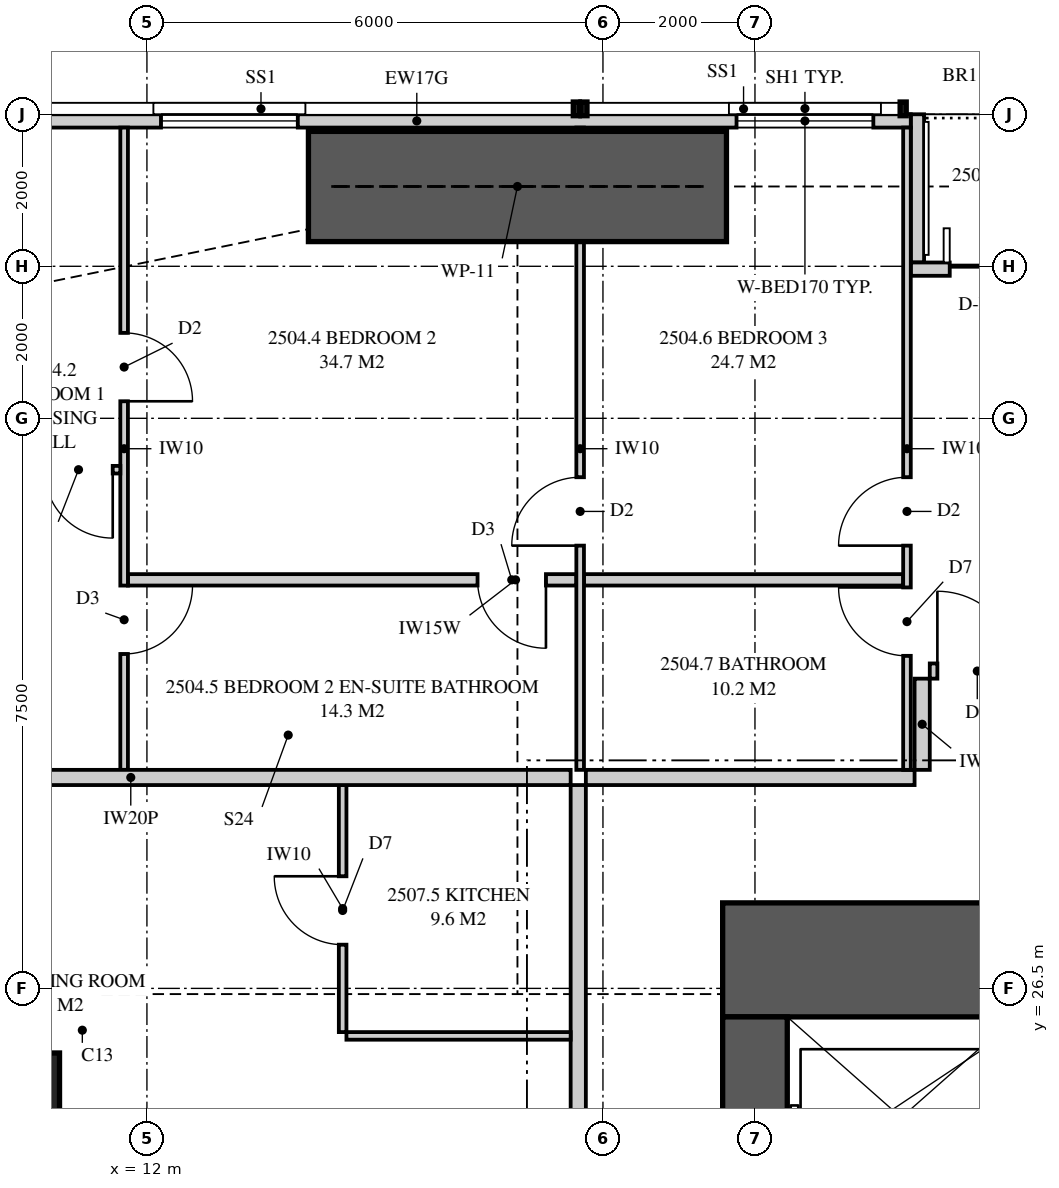
"""IFC4 building model, lengths in metres.
Left out: names, types, materials, properties, quantities, classifications, styles, units other than length and angle.
Written with IfcOpenShell. Run it as: python <this file> out.ifc"""

import sys

from ifc_helpers import new_model, si_unit, direction, frame, frame_2d, origin, origin_2d, place, context, subcontext, project, spatial, polyline, rectangle, outline, extrude, element, fill, save


model = new_model("IFC4")
c1 = context("Model", 3, precision=1e-05, world=origin(), true_north=direction((0.0, 1.0)))
c2 = subcontext(c1, "Body", "Model", "MODEL_VIEW")
j1 = project(units=[si_unit("LENGTHUNIT", "METRE"), si_unit("PLANEANGLEUNIT", "RADIAN")], contexts=[c1])
p1 = place(None, origin())
s1 = spatial("IfcSite", under=j1, at=p1, CompositionType="ELEMENT")
p2 = place(p1, origin())
s2 = spatial("IfcBuilding", under=s1, at=p2, CompositionType="ELEMENT")
p3 = place(p2, frame((0.0, 0.0, 94.8)))
s3 = spatial("IfcBuildingStorey", under=s2, at=p3, CompositionType="ELEMENT", Elevation=94.8)
p4 = place(p3, frame((10.2, 25.0, 0.0), z_axis=(0.0, 0.0, 1.0), x_axis=(1.0, 0.0, 0.0)))
e1 = element("IfcColumn", 1, at=p4, inside=s3, PredefinedType="COLUMN", context=c2, shape_type="SweptSolid", body=[
    extrude(rectangle(XDim=1.3, YDim=1.3, at=origin_2d()), origin(), (0.0, 0.0, 1.0), 3.35),
])
p5 = place(p3, frame((26.0, 26.875, 0.0), z_axis=(0.0, 0.0, 1.0), x_axis=(-1.0, 0.0, 0.0)))
e2 = element("IfcWall", 2, at=p5, inside=s3, PredefinedType="SHEAR", context=c2, shape_type="SweptSolid", body=[
    extrude(rectangle(XDim=6.425, YDim=1.5, at=frame_2d((3.212, 0.0))), origin(), (0.0, 0.0, 1.0), 3.35),
])
p6 = place(p5, frame((0.825, 0.0, 0.0)))
e3 = element("IfcOpeningElement", 3, at=p6, cuts=e2, PredefinedType="OPENING", context=c2, shape_type="SweptSolid", body=[
    extrude(rectangle(XDim=0.75, YDim=2.1, at=frame_2d((0.375, 1.05))), frame((0.0, 0.76, 0.0), z_axis=(0.0, -1.0, 0.0), x_axis=(1.0, 0.0, 0.0)), (0.0, 0.0, 1.0), 1.52),
])
p7 = place(p3, frame((20.0, 26.125, 0.0), z_axis=(0.0, 0.0, 1.0), x_axis=(0.0, -1.0, 0.0)))
e4 = element("IfcWall", 4, at=p7, inside=s3, PredefinedType="SHEAR", context=c2, shape_type="SweptSolid", body=[
    extrude(rectangle(XDim=2.825, YDim=0.85, at=frame_2d((1.413, 0.0))), origin(), (0.0, 0.0, 1.0), 3.35),
])
p8 = place(p3, frame((22.05, 37.913, 0.0), z_axis=(0.0, 0.0, 1.0), x_axis=(-1.0, 0.0, 0.0)))
e5 = element("IfcWall", 5, at=p8, inside=s3, PredefinedType="SOLIDWALL", context=c2, shape_type="SweptSolid", body=[
    extrude(outline(polyline([(0.0, 0.0), (12.999, 0.0), (12.999, 3.11), (5.378, 3.11), (5.378, 2.15), (5.333, 2.15), (5.333, 3.11), (5.175, 3.11), (5.175, 2.15), (0.0, 2.15), (0.0, 0.0)])), frame((0.0, 0.087, 0.0), z_axis=(0.0, -1.0, 0.0), x_axis=(1.0, 0.0, 0.0)), (0.0, 0.0, 1.0), 0.175),
])
p9 = place(p8, frame((0.492, 0.0, 0.4)))
e6 = element("IfcOpeningElement", 6, at=p9, cuts=e5, PredefinedType="OPENING", context=c2, shape_type="SweptSolid", body=[
    extrude(rectangle(XDim=1.8, YDim=1.7, at=frame_2d((0.9, 0.85))), frame((0.0, 0.097, 0.0), z_axis=(0.0, -1.0, 0.0), x_axis=(1.0, 0.0, 0.0)), (0.0, 0.0, 1.0), 0.195),
])
p10 = place(p8, frame((8.065, 0.0, 0.4)))
e7 = element("IfcOpeningElement", 7, at=p10, cuts=e5, PredefinedType="OPENING", context=c2, shape_type="SweptSolid", body=[
    extrude(rectangle(XDim=1.8, YDim=1.7, at=frame_2d((0.9, 0.85))), frame((0.0, 0.097, 0.0), z_axis=(0.0, -1.0, 0.0), x_axis=(1.0, 0.0, 0.0)), (0.0, 0.0, 1.0), 0.195),
])
p11 = place(p3, frame((24.875, 35.962, 0.0), z_axis=(0.0, 0.0, 1.0), x_axis=(-1.0, 0.0, 0.0)))
e8 = element("IfcWall", 8, at=p11, inside=s3, PredefinedType="SOLIDWALL", context=c2, shape_type="SweptSolid", body=[
    extrude(rectangle(XDim=2.825, YDim=0.175, at=frame_2d((1.413, 0.0))), origin(), (0.0, 0.0, 1.0), 3.11),
])
p12 = place(p11, frame((0.512, 0.0, 0.0)))
e9 = element("IfcOpeningElement", 9, at=p12, cuts=e8, PredefinedType="OPENING", context=c2, shape_type="SweptSolid", body=[
    extrude(rectangle(XDim=1.8, YDim=2.1, at=frame_2d((0.9, 1.05))), frame((0.0, 0.097, 0.0), z_axis=(0.0, -1.0, 0.0), x_axis=(1.0, 0.0, 0.0)), (0.0, 0.0, 1.0), 0.195),
])
p13 = place(p3, frame((22.137, 38.0, 0.0), z_axis=(0.0, 0.0, 1.0), x_axis=(0.0, -1.0, 0.0)))
e10 = element("IfcWall", 10, at=p13, inside=s3, PredefinedType="SOLIDWALL", context=c2, shape_type="SweptSolid", body=[
    extrude(outline(polyline([(0.0, 0.0), (1.95, 0.0), (1.95, 3.11), (1.75, 3.11), (1.75, 2.15), (0.15, 2.15), (0.15, 3.11), (0.0, 3.11), (0.0, 0.0)])), frame((0.0, 0.087, 0.0), z_axis=(0.0, -1.0, 0.0), x_axis=(1.0, 0.0, 0.0)), (0.0, 0.0, 1.0), 0.175),
])
p14 = place(p3, frame((17.775, 29.275, 0.0), z_axis=(0.0, 0.0, 1.0), x_axis=(1.0, 0.0, 0.0)))
e11 = element("IfcWall", 11, at=p14, inside=s3, PredefinedType="PARTITIONING", context=c2, shape_type="SweptSolid", body=[
    extrude(rectangle(XDim=4.325, YDim=0.2, at=frame_2d((2.163, 0.0))), origin(), (0.0, 0.0, 1.0), 3.11),
])
p15 = place(p3, frame((11.7, 37.825, 0.0), z_axis=(0.0, 0.0, 1.0), x_axis=(0.0, -1.0, 0.0)))
e12 = element("IfcWall", 12, at=p15, inside=s3, PredefinedType="PARTITIONING", context=c2, shape_type="SweptSolid", body=[
    extrude(outline(polyline([(0.0, 0.0), (8.45, 0.0), (8.45, 3.11), (2.708, 3.11), (2.708, 2.15), (0.953, 2.15), (0.953, 3.11), (0.0, 3.11), (0.0, 0.0)])), frame((0.0, 0.05, 0.0), z_axis=(0.0, -1.0, 0.0), x_axis=(1.0, 0.0, 0.0)), (0.0, 0.0, 1.0), 0.1),
])
p16 = place(p15, frame((2.701, 0.0, 0.0)))
e13 = element("IfcOpeningElement", 13, at=p16, cuts=e12, PredefinedType="OPENING", context=c2, shape_type="SweptSolid", body=[
    extrude(rectangle(XDim=0.9, YDim=2.1, at=frame_2d((0.45, 1.05))), frame((0.0, 0.06, 0.0), z_axis=(0.0, -1.0, 0.0), x_axis=(1.0, 0.0, 0.0)), (0.0, 0.0, 1.0), 0.12),
])
p17 = place(p15, frame((6.025, 0.0, 0.0)))
e14 = element("IfcOpeningElement", 14, at=p17, cuts=e12, PredefinedType="OPENING", context=c2, shape_type="SweptSolid", body=[
    extrude(rectangle(XDim=0.9, YDim=2.1, at=frame_2d((0.45, 1.05))), frame((0.0, 0.06, 0.0), z_axis=(0.0, -1.0, 0.0), x_axis=(1.0, 0.0, 0.0)), (0.0, 0.0, 1.0), 0.12),
])
p18 = place(p3, frame((17.7, 37.825, 0.0), z_axis=(0.0, 0.0, 1.0), x_axis=(0.0, -1.0, 0.0)))
e15 = element("IfcWall", 15, at=p18, inside=s3, PredefinedType="PARTITIONING", context=c2, shape_type="SweptSolid", body=[
    extrude(outline(polyline([(1.635, 2.15), (0.0, 2.15), (0.0, 0.0), (8.45, 0.0), (8.45, 3.11), (1.635, 3.11), (1.635, 2.15)]), holes=[polyline([(1.021, 0.116), (0.529, 0.116), (0.529, 0.906), (1.021, 0.906), (1.021, 0.116)]), polyline([(1.021, 1.244), (0.529, 1.244), (0.529, 2.034), (1.021, 2.034), (1.021, 1.244)])]), frame((0.0, 0.05, 0.0), z_axis=(0.0, -1.0, 0.0), x_axis=(1.0, 0.0, 0.0)), (0.0, 0.0, 1.0), 0.1),
])
p19 = place(p18, frame((4.6, 0.0, 0.0)))
e16 = element("IfcOpeningElement", 16, at=p19, cuts=e15, PredefinedType="OPENING", context=c2, shape_type="SweptSolid", body=[
    extrude(rectangle(XDim=0.9, YDim=2.1, at=frame_2d((0.45, 1.05))), frame((0.0, 0.06, 0.0), z_axis=(0.0, -1.0, 0.0), x_axis=(1.0, 0.0, 0.0)), (0.0, 0.0, 1.0), 0.12),
])
p20 = place(p3, frame((22.0, 37.825, 0.0), z_axis=(0.0, 0.0, 1.0), x_axis=(0.0, -1.0, 0.0)))
e17 = element("IfcWall", 17, at=p20, inside=s3, PredefinedType="PARTITIONING", context=c2, shape_type="SweptSolid", body=[
    extrude(outline(polyline([(0.0, 0.0), (8.45, 0.0), (8.45, 3.11), (1.635, 3.11), (1.635, 2.15), (0.0, 2.15), (0.0, 3.11), (0.0, 0.0)])), frame((0.0, 0.05, 0.0), z_axis=(0.0, -1.0, 0.0), x_axis=(1.0, 0.0, 0.0)), (0.0, 0.0, 1.0), 0.1),
])
p21 = place(p20, frame((4.6, 0.0, 0.0)))
e18 = element("IfcOpeningElement", 18, at=p21, cuts=e17, PredefinedType="OPENING", context=c2, shape_type="SweptSolid", body=[
    extrude(rectangle(XDim=0.9, YDim=2.1, at=frame_2d((0.45, 1.05))), frame((0.0, 0.06, 0.0), z_axis=(0.0, -1.0, 0.0), x_axis=(1.0, 0.0, 0.0)), (0.0, 0.0, 1.0), 0.12),
])
p22 = place(p20, frame((6.05, 0.0, 0.0)))
e19 = element("IfcOpeningElement", 19, at=p22, cuts=e17, PredefinedType="OPENING", context=c2, shape_type="SweptSolid", body=[
    extrude(rectangle(XDim=0.9, YDim=2.1, at=frame_2d((0.45, 1.05))), frame((0.0, 0.06, 0.0), z_axis=(0.0, -1.0, 0.0), x_axis=(1.0, 0.0, 0.0)), (0.0, 0.0, 1.0), 0.12),
])
p23 = place(p3, frame((6.0, 33.324, 0.0), z_axis=(0.0, 0.0, 1.0), x_axis=(1.0, 0.0, 0.0)))
e20 = element("IfcWall", 20, at=p23, inside=s3, PredefinedType="PARTITIONING", context=c2, shape_type="SweptSolid", body=[
    extrude(outline(polyline([(0.0, 0.0), (5.65, 0.0), (5.65, 3.11), (5.46, 3.11), (5.46, 2.51), (3.171, 2.51), (3.171, 2.15), (1.429, 2.15), (1.429, 3.11), (0.0, 3.11), (0.0, 0.0)])), frame((0.0, 0.05, 0.0), z_axis=(0.0, -1.0, 0.0), x_axis=(1.0, 0.0, 0.0)), (0.0, 0.0, 1.0), 0.1),
])
p24 = place(p23, frame((4.65, 0.0, 0.0)))
e21 = element("IfcOpeningElement", 21, at=p24, cuts=e20, PredefinedType="OPENING", context=c2, shape_type="SweptSolid", body=[
    extrude(rectangle(XDim=0.9, YDim=2.1, at=frame_2d((0.45, 1.05))), frame((0.0, 0.06, 0.0), z_axis=(0.0, -1.0, 0.0), x_axis=(1.0, 0.0, 0.0)), (0.0, 0.0, 1.0), 0.12),
])
p25 = place(p3, frame((11.75, 31.875, 0.0), z_axis=(0.0, 0.0, 1.0), x_axis=(1.0, 0.0, 0.0)))
e22 = element("IfcWall", 22, at=p25, inside=s3, PredefinedType="PLUMBINGWALL", context=c2, shape_type="SweptSolid", body=[
    extrude(outline(polyline([(0.0, 0.0), (5.9, 0.0), (5.9, 3.11), (5.438, 3.11), (5.438, 2.541), (4.812, 2.541), (4.812, 3.11), (0.0, 3.11), (0.0, 0.0)])), frame((0.0, 0.075, 0.0), z_axis=(0.0, -1.0, 0.0), x_axis=(1.0, 0.0, 0.0)), (0.0, 0.0, 1.0), 0.15),
])
p26 = place(p25, frame((4.6, 0.0, 0.0)))
e23 = element("IfcOpeningElement", 23, at=p26, cuts=e22, PredefinedType="OPENING", context=c2, shape_type="SweptSolid", body=[
    extrude(rectangle(XDim=0.9, YDim=2.1, at=frame_2d((0.45, 1.05))), frame((0.0, 0.085, 0.0), z_axis=(0.0, -1.0, 0.0), x_axis=(1.0, 0.0, 0.0)), (0.0, 0.0, 1.0), 0.17),
])
p27 = place(p3, frame((17.75, 31.875, 0.0), z_axis=(0.0, 0.0, 1.0), x_axis=(1.0, 0.0, 0.0)))
e24 = element("IfcWall", 24, at=p27, inside=s3, PredefinedType="PLUMBINGWALL", context=c2, shape_type="SweptSolid", body=[
    extrude(rectangle(XDim=4.2, YDim=0.15, at=frame_2d((2.1, 0.0))), origin(), (0.0, 0.0, 1.0), 3.11),
])
p28 = place(p3, frame((6.0, 29.275, 0.0), z_axis=(0.0, 0.0, 1.0), x_axis=(1.0, 0.0, 0.0)))
e25 = element("IfcWall", 25, at=p28, inside=s3, PredefinedType="PARTITIONING", context=c2, shape_type="SweptSolid", body=[
    extrude(outline(polyline([(0.0, 0.0), (11.575, 0.0), (11.575, 3.11), (11.212, 3.11), (11.212, 2.541), (10.538, 2.541), (10.538, 3.11), (5.51, 3.11), (5.51, 2.51), (2.969, 2.51), (2.969, 2.541), (2.565, 2.541), (2.565, 2.15), (0.721, 2.15), (0.721, 3.11), (0.0, 3.11), (0.0, 0.0)])), frame((0.0, 0.1, 0.0), z_axis=(0.0, -1.0, 0.0), x_axis=(1.0, 0.0, 0.0)), (0.0, 0.0, 1.0), 0.2),
])
p29 = place(p3, frame((14.575, 25.925, 0.0), z_axis=(0.0, 0.0, 1.0), x_axis=(0.0, 1.0, 0.0)))
e26 = element("IfcWall", 26, at=p29, inside=s3, PredefinedType="PARTITIONING", context=c2, shape_type="SweptSolid", body=[
    extrude(outline(polyline([(0.0, 0.0), (3.25, 0.0), (3.25, 3.11), (0.787, 3.11), (0.787, 2.541), (0.213, 2.541), (0.213, 3.11), (0.0, 3.11), (0.0, 0.0)])), frame((0.0, 0.05, 0.0), z_axis=(0.0, -1.0, 0.0), x_axis=(1.0, 0.0, 0.0)), (0.0, 0.0, 1.0), 0.1),
])
p30 = place(p29, frame((1.15, 0.0, 0.0)))
e27 = element("IfcOpeningElement", 27, at=p30, cuts=e26, PredefinedType="OPENING", context=c2, shape_type="SweptSolid", body=[
    extrude(rectangle(XDim=0.9, YDim=2.1, at=frame_2d((0.45, 1.05))), frame((0.0, 0.06, 0.0), z_axis=(0.0, -1.0, 0.0), x_axis=(1.0, 0.0, 0.0)), (0.0, 0.0, 1.0), 0.12),
])
p31 = place(p3, frame((14.625, 25.875, 0.0), z_axis=(0.0, 0.0, 1.0), x_axis=(1.0, 0.0, 0.0)))
e28 = element("IfcWall", 28, at=p31, inside=s3, PredefinedType="PARTITIONING", context=c2, shape_type="SweptSolid", body=[
    extrude(rectangle(XDim=2.95, YDim=0.1, at=frame_2d((1.475, 0.0))), origin(), (0.0, 0.0, 1.0), 3.11),
])
p32 = place(p3, frame((22.3, 30.675, 0.0), z_axis=(0.0, 0.0, 1.0), x_axis=(1.0, 0.0, 0.0)))
e29 = element("IfcWall", 29, at=p32, inside=s3, PredefinedType="PARTITIONING", context=c2, shape_type="SweptSolid", body=[
    extrude(rectangle(XDim=2.4, YDim=0.2, at=frame_2d((1.2, 0.0))), origin(), (0.0, 0.0, 1.0), 3.11),
])
p33 = place(p32, frame((0.1, 0.0, 0.0)))
e30 = element("IfcOpeningElement", 30, at=p33, cuts=e29, PredefinedType="OPENING", context=c2, shape_type="SweptSolid", body=[
    extrude(rectangle(XDim=1.05, YDim=2.2, at=frame_2d((0.525, 1.1))), frame((0.0, 0.11, 0.0), z_axis=(0.0, -1.0, 0.0), x_axis=(1.0, 0.0, 0.0)), (0.0, 0.0, 1.0), 0.22),
])
p34 = place(p3, frame((22.2, 29.375, 0.0), z_axis=(0.0, 0.0, 1.0), x_axis=(0.0, 1.0, 0.0)))
e31 = element("IfcWall", 31, at=p34, inside=s3, PredefinedType="PARTITIONING", context=c2, shape_type="SweptSolid", body=[
    extrude(rectangle(XDim=1.2, YDim=0.2, at=frame_2d((0.6, 0.0))), origin(), (0.0, 0.0, 1.0), 3.11),
])
p35 = place(p3, frame((17.675, 23.238, 0.0), z_axis=(0.0, 0.0, 1.0), x_axis=(0.0, 1.0, 0.0)))
e32 = element("IfcWall", 32, at=p35, inside=s3, PredefinedType="PARTITIONING", context=c2, shape_type="SweptSolid", body=[
    extrude(outline(polyline([(0.0, 0.0), (5.938, 0.0), (5.938, 3.11), (3.525, 3.11), (3.525, 2.541), (2.85, 2.541), (2.85, 3.11), (0.0, 3.11), (0.0, 0.0)])), frame((0.0, 0.1, 0.0), z_axis=(0.0, -1.0, 0.0), x_axis=(1.0, 0.0, 0.0)), (0.0, 0.0, 1.0), 0.2),
])
p36 = place(p3, frame((14.125, 37.05, 0.0), z_axis=(0.0, 0.0, 1.0), x_axis=(1.0, 0.0, 0.0)))
e33 = element("IfcWall", 33, at=p36, inside=s3, PredefinedType="SHEAR", context=c2, shape_type="SweptSolid", body=[
    extrude(rectangle(XDim=5.5, YDim=1.45, at=frame_2d((2.75, 0.0))), origin(), (0.0, 0.0, 1.0), 3.35),
])
p37 = place(p12, origin())
e34 = element("IfcDoor", 34, at=p37, inside=s3, OperationType="SLIDING_TO_LEFT", PredefinedType="DOOR", context=c2, shape_type="SweptSolid", body=[
    extrude(rectangle(XDim=1.8, YDim=2.1, at=frame_2d((0.9, 1.05))), frame((0.0, 0.025, 0.0), z_axis=(0.0, -1.0, 0.0), x_axis=(1.0, 0.0, 0.0)), (0.0, 0.0, 1.0), 0.05),
])
fill(e9, e34)
p38 = place(p9, origin())
e35 = element("IfcWindow", 35, at=p38, inside=s3, PartitioningType="SINGLE_PANEL", PredefinedType="WINDOW", context=c2, shape_type="SweptSolid", body=[
    extrude(rectangle(XDim=1.8, YDim=1.7, at=frame_2d((0.9, 0.85))), frame((0.0, 0.03, 0.0), z_axis=(0.0, -1.0, 0.0), x_axis=(1.0, 0.0, 0.0)), (0.0, 0.0, 1.0), 0.06),
])
fill(e6, e35)
p39 = place(p10, origin())
e36 = element("IfcWindow", 36, at=p39, inside=s3, PartitioningType="SINGLE_PANEL", PredefinedType="WINDOW", context=c2, shape_type="SweptSolid", body=[
    extrude(rectangle(XDim=1.8, YDim=1.7, at=frame_2d((0.9, 0.85))), frame((0.0, 0.03, 0.0), z_axis=(0.0, -1.0, 0.0), x_axis=(1.0, 0.0, 0.0)), (0.0, 0.0, 1.0), 0.06),
])
fill(e7, e36)
p40 = place(p33, origin())
e37 = element("IfcDoor", 37, at=p40, inside=s3, OperationType="SINGLE_SWING_LEFT", PredefinedType="DOOR", context=c2, shape_type="SweptSolid", body=[
    extrude(rectangle(XDim=1.05, YDim=2.2, at=frame_2d((0.525, 1.1))), frame((0.0, 0.025, 0.0), z_axis=(0.0, -1.0, 0.0), x_axis=(1.0, 0.0, 0.0)), (0.0, 0.0, 1.0), 0.05),
])
fill(e30, e37)
p41 = place(p24, frame((0.9, 0.0, 0.0), z_axis=(0.0, 0.0, 1.0), x_axis=(-1.0, 0.0, 0.0)))
e38 = element("IfcDoor", 38, at=p41, inside=s3, OperationType="SINGLE_SWING_LEFT", PredefinedType="DOOR", context=c2, shape_type="SweptSolid", body=[
    extrude(rectangle(XDim=0.9, YDim=2.1, at=frame_2d((0.45, 1.05))), frame((0.0, 0.025, 0.0), z_axis=(0.0, -1.0, 0.0), x_axis=(1.0, 0.0, 0.0)), (0.0, 0.0, 1.0), 0.05),
])
fill(e21, e38)
p42 = place(p16, origin())
e39 = element("IfcDoor", 39, at=p42, inside=s3, OperationType="SINGLE_SWING_RIGHT", PredefinedType="DOOR", context=c2, shape_type="SweptSolid", body=[
    extrude(rectangle(XDim=0.9, YDim=2.1, at=frame_2d((0.45, 1.05))), frame((0.0, 0.025, 0.0), z_axis=(0.0, -1.0, 0.0), x_axis=(1.0, 0.0, 0.0)), (0.0, 0.0, 1.0), 0.05),
])
fill(e13, e39)
p43 = place(p19, frame((0.9, 0.0, 0.0), z_axis=(0.0, 0.0, 1.0), x_axis=(-1.0, 0.0, 0.0)))
e40 = element("IfcDoor", 40, at=p43, inside=s3, OperationType="SINGLE_SWING_LEFT", PredefinedType="DOOR", context=c2, shape_type="SweptSolid", body=[
    extrude(rectangle(XDim=0.9, YDim=2.1, at=frame_2d((0.45, 1.05))), frame((0.0, 0.025, 0.0), z_axis=(0.0, -1.0, 0.0), x_axis=(1.0, 0.0, 0.0)), (0.0, 0.0, 1.0), 0.05),
])
fill(e16, e40)
p44 = place(p26, frame((0.9, 0.0, 0.0), z_axis=(0.0, 0.0, 1.0), x_axis=(-1.0, 0.0, 0.0)))
e41 = element("IfcDoor", 41, at=p44, inside=s3, OperationType="SINGLE_SWING_LEFT", PredefinedType="DOOR", context=c2, shape_type="SweptSolid", body=[
    extrude(rectangle(XDim=0.9, YDim=2.1, at=frame_2d((0.45, 1.05))), frame((0.0, 0.025, 0.0), z_axis=(0.0, -1.0, 0.0), x_axis=(1.0, 0.0, 0.0)), (0.0, 0.0, 1.0), 0.05),
])
fill(e23, e41)
p45 = place(p21, frame((0.9, 0.0, 0.0), z_axis=(0.0, 0.0, 1.0), x_axis=(-1.0, 0.0, 0.0)))
e42 = element("IfcDoor", 42, at=p45, inside=s3, OperationType="SINGLE_SWING_LEFT", PredefinedType="DOOR", context=c2, shape_type="SweptSolid", body=[
    extrude(rectangle(XDim=0.9, YDim=2.1, at=frame_2d((0.45, 1.05))), frame((0.0, 0.025, 0.0), z_axis=(0.0, -1.0, 0.0), x_axis=(1.0, 0.0, 0.0)), (0.0, 0.0, 1.0), 0.05),
])
fill(e18, e42)
p46 = place(p22, frame((0.9, 0.0, 0.0), z_axis=(0.0, 0.0, 1.0), x_axis=(-1.0, 0.0, 0.0)))
e43 = element("IfcDoor", 43, at=p46, inside=s3, OperationType="SINGLE_SWING_RIGHT", PredefinedType="DOOR", context=c2, shape_type="SweptSolid", body=[
    extrude(rectangle(XDim=0.9, YDim=2.1, at=frame_2d((0.45, 1.05))), frame((0.0, 0.025, 0.0), z_axis=(0.0, -1.0, 0.0), x_axis=(1.0, 0.0, 0.0)), (0.0, 0.0, 1.0), 0.05),
])
fill(e19, e43)
p47 = place(p17, origin())
e44 = element("IfcDoor", 44, at=p47, inside=s3, OperationType="SINGLE_SWING_LEFT", PredefinedType="DOOR", context=c2, shape_type="SweptSolid", body=[
    extrude(rectangle(XDim=0.9, YDim=2.1, at=frame_2d((0.45, 1.05))), frame((0.0, 0.025, 0.0), z_axis=(0.0, -1.0, 0.0), x_axis=(1.0, 0.0, 0.0)), (0.0, 0.0, 1.0), 0.05),
])
fill(e14, e44)
p48 = place(p30, origin())
e45 = element("IfcDoor", 45, at=p48, inside=s3, OperationType="SINGLE_SWING_RIGHT", PredefinedType="DOOR", context=c2, shape_type="SweptSolid", body=[
    extrude(rectangle(XDim=0.9, YDim=2.1, at=frame_2d((0.45, 1.05))), frame((0.0, 0.025, 0.0), z_axis=(0.0, -1.0, 0.0), x_axis=(1.0, 0.0, 0.0)), (0.0, 0.0, 1.0), 0.05),
])
fill(e27, e45)
save(model, sys.argv[1])
